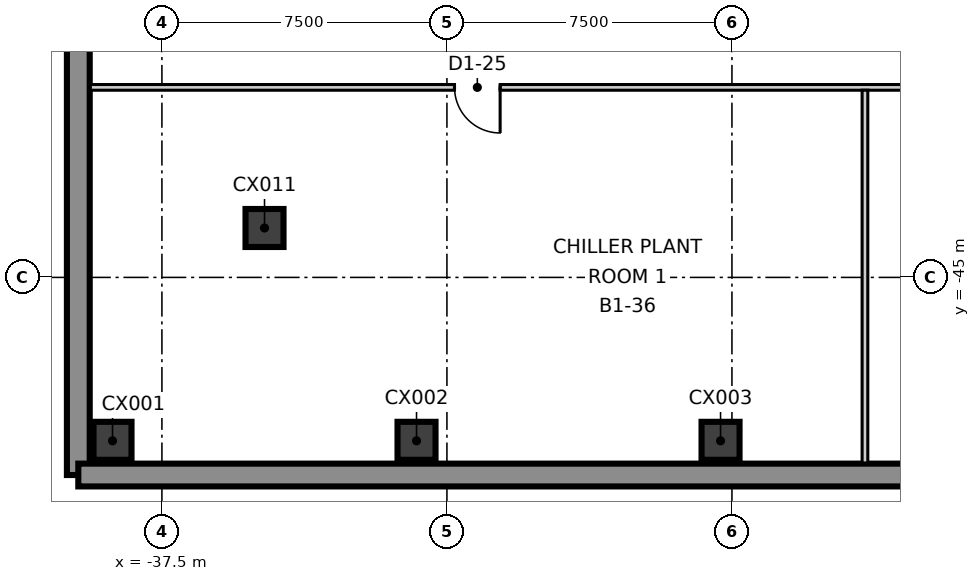
"""IFC4 building model, lengths in metres.
Left out: names, types, materials, properties, quantities, classifications, styles, units other than length and angle.
Written with IfcOpenShell. Run it as: python <this file> out.ifc"""

import sys

from ifc_helpers import new_model, si_unit, direction, frame, frame_2d, origin, origin_2d, place, context, subcontext, project, spatial, rectangle, extrude, element, fill, save


model = new_model("IFC4")
c1 = context("Model", 3, precision=1e-05, world=origin(), true_north=direction((0.0, 1.0)))
c2 = subcontext(c1, "Body", "Model", "MODEL_VIEW")
j1 = project(units=[si_unit("LENGTHUNIT", "METRE"), si_unit("PLANEANGLEUNIT", "RADIAN")], contexts=[c1])
p1 = place(None, origin())
s1 = spatial("IfcSite", under=j1, at=p1, CompositionType="ELEMENT")
p2 = place(p1, origin())
s2 = spatial("IfcBuilding", under=s1, at=p2, CompositionType="ELEMENT")
p3 = place(p2, frame((0.0, 0.0, -5.5)))
s3 = spatial("IfcBuildingStorey", under=s2, at=p3, CompositionType="ELEMENT", Elevation=-5.5)
p4 = place(p3, frame((-39.7, -22.8, -0.4), z_axis=(0.0, 0.0, 1.0), x_axis=(0.0, -1.0, 0.0)))
e1 = element("IfcWall", 1, at=p4, inside=s3, PredefinedType="SOLIDWALL", context=c2, shape_type="SweptSolid", body=[
    extrude(rectangle(XDim=27.4, YDim=0.6, at=frame_2d((13.7, 0.0))), origin(), (0.0, 0.0, 1.0), 5.5),
])
p5 = place(p3, frame((-39.7, -50.2, -0.4), z_axis=(0.0, 0.0, 1.0), x_axis=(1.0, 0.0, 0.0)))
e2 = element("IfcWall", 2, at=p5, inside=s3, PredefinedType="SOLIDWALL", context=c2, shape_type="SweptSolid", body=[
    extrude(rectangle(XDim=79.4, YDim=0.6, at=frame_2d((39.7, 0.0))), origin(), (0.0, 0.0, 1.0), 5.5),
])
for number, where, z_axis, x_axis in (
    (3, (-38.8, -49.3, -0.4), (0.0, 0.0, 1.0), (1.0, 0.0, 0.0)),
    (4, (-30.8, -49.3, -0.4), (0.0, 0.0, 1.0), (1.0, 0.0, 0.0)),
    (5, (-22.8, -49.3, -0.4), (0.0, 0.0, 1.0), (1.0, 0.0, 0.0)),
    (6, (-34.8, -43.7, -0.4), (0.0, 0.0, 1.0), (1.0, 0.0, 0.0)),
):
    element("IfcColumn", number, at=place(p3, frame(where, z_axis=z_axis, x_axis=x_axis)), inside=s3, PredefinedType="COLUMN", context=c2, shape_type="SweptSolid", body=[
        extrude(rectangle(XDim=1.0, YDim=1.0, at=origin_2d()), origin(), (0.0, 0.0, 1.0), 5.5),
    ])
p6 = place(p3, frame((-39.4, -40.0, 0.0), z_axis=(0.0, 0.0, 1.0), x_axis=(1.0, 0.0, 0.0)))
e7 = element("IfcWall", 7, at=p6, inside=s3, PredefinedType="PARTITIONING", context=c2, shape_type="SweptSolid", body=[
    extrude(rectangle(XDim=78.8, YDim=0.15, at=frame_2d((39.4, 0.0))), origin(), (0.0, 0.0, 1.0), 5.1),
])
p7 = place(p6, frame((9.6, 0.0, 0.0)))
e8 = element("IfcOpeningElement", 8, at=p7, cuts=e7, PredefinedType="OPENING", context=c2, shape_type="SweptSolid", body=[
    extrude(rectangle(XDim=1.2, YDim=2.1, at=frame_2d((0.6, 1.05))), frame((0.0, 0.085, 0.0), z_axis=(0.0, -1.0, 0.0), x_axis=(1.0, 0.0, 0.0)), (0.0, 0.0, 1.0), 0.17),
])
p8 = place(p6, frame((24.9, 0.0, 0.0)))
e9 = element("IfcOpeningElement", 9, at=p8, cuts=e7, PredefinedType="OPENING", context=c2, shape_type="SweptSolid", body=[
    extrude(rectangle(XDim=1.0, YDim=2.1, at=frame_2d((0.5, 1.05))), frame((0.0, 0.085, 0.0), z_axis=(0.0, -1.0, 0.0), x_axis=(1.0, 0.0, 0.0)), (0.0, 0.0, 1.0), 0.17),
])
p9 = place(p6, frame((33.54, 0.0, 0.0)))
e10 = element("IfcOpeningElement", 10, at=p9, cuts=e7, PredefinedType="OPENING", context=c2, shape_type="SweptSolid", body=[
    extrude(rectangle(XDim=1.0, YDim=2.1, at=frame_2d((0.5, 1.05))), frame((0.0, 0.085, 0.0), z_axis=(0.0, -1.0, 0.0), x_axis=(1.0, 0.0, 0.0)), (0.0, 0.0, 1.0), 0.17),
])
p10 = place(p6, frame((44.4, 0.0, 0.0)))
e11 = element("IfcOpeningElement", 11, at=p10, cuts=e7, PredefinedType="OPENING", context=c2, shape_type="SweptSolid", body=[
    extrude(rectangle(XDim=1.0, YDim=2.1, at=frame_2d((0.5, 1.05))), frame((0.0, 0.085, 0.0), z_axis=(0.0, -1.0, 0.0), x_axis=(1.0, 0.0, 0.0)), (0.0, 0.0, 1.0), 0.17),
])
p11 = place(p6, frame((53.9, 0.0, 0.0)))
e12 = element("IfcOpeningElement", 12, at=p11, cuts=e7, PredefinedType="OPENING", context=c2, shape_type="SweptSolid", body=[
    extrude(rectangle(XDim=1.0, YDim=2.1, at=frame_2d((0.5, 1.05))), frame((0.0, 0.085, 0.0), z_axis=(0.0, -1.0, 0.0), x_axis=(1.0, 0.0, 0.0)), (0.0, 0.0, 1.0), 0.17),
])
p12 = place(p6, frame((65.7, 0.0, 0.0)))
e13 = element("IfcOpeningElement", 13, at=p12, cuts=e7, PredefinedType="OPENING", context=c2, shape_type="SweptSolid", body=[
    extrude(rectangle(XDim=1.2, YDim=2.1, at=frame_2d((0.6, 1.05))), frame((0.0, 0.085, 0.0), z_axis=(0.0, -1.0, 0.0), x_axis=(1.0, 0.0, 0.0)), (0.0, 0.0, 1.0), 0.17),
])
p13 = place(p3, frame((-19.0, -49.9, 0.0), z_axis=(0.0, 0.0, 1.0), x_axis=(0.0, 1.0, 0.0)))
e14 = element("IfcWall", 14, at=p13, inside=s3, PredefinedType="PARTITIONING", context=c2, shape_type="SweptSolid", body=[
    extrude(rectangle(XDim=9.825, YDim=0.15, at=frame_2d((4.913, 0.0))), origin(), (0.0, 0.0, 1.0), 5.1),
])
p14 = place(p7, origin())
e15 = element("IfcDoor", 15, at=p14, inside=s3, OperationType="SINGLE_SWING_RIGHT", PredefinedType="DOOR", context=c2, shape_type="SweptSolid", body=[
    extrude(rectangle(XDim=1.2, YDim=2.1, at=frame_2d((0.6, 1.05))), frame((0.0, 0.025, 0.0), z_axis=(0.0, -1.0, 0.0), x_axis=(1.0, 0.0, 0.0)), (0.0, 0.0, 1.0), 0.05),
])
fill(e8, e15)
save(model, sys.argv[1])
